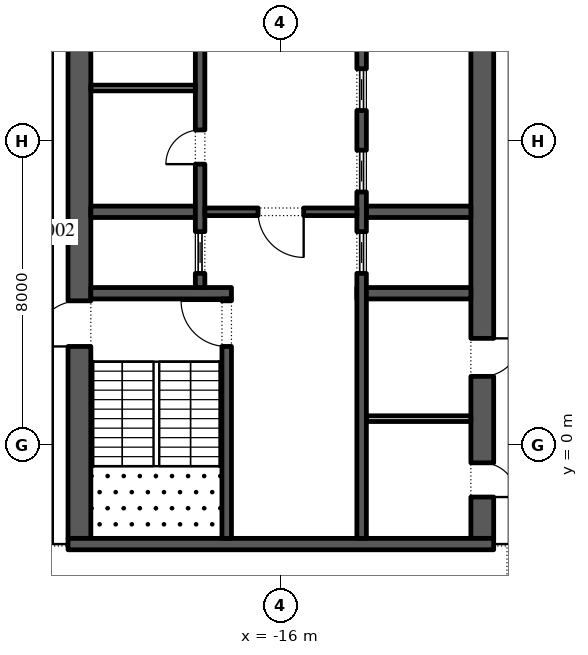
"""IFC4 building model, lengths in metres.
Left out: names, types, materials, properties, quantities, classifications, styles, units other than length and angle.
Written with IfcOpenShell. Run it as: python <this file> out.ifc"""

import sys

from ifc_helpers import new_model, si_unit, direction, frame, frame_2d, origin, place, context, subcontext, project, spatial, rectangle, extrude, element, fill, save


model = new_model("IFC4")
c1 = context("Model", 3, precision=1e-05, world=origin(), true_north=direction((0.0, 1.0)))
c2 = subcontext(c1, "Body", "Model", "MODEL_VIEW")
j1 = project(units=[si_unit("LENGTHUNIT", "METRE"), si_unit("PLANEANGLEUNIT", "RADIAN")], contexts=[c1])
p1 = place(None, origin())
s1 = spatial("IfcSite", under=j1, at=p1, CompositionType="ELEMENT")
p2 = place(p1, origin())
s2 = spatial("IfcBuilding", under=s1, at=p2, CompositionType="ELEMENT")
p3 = place(p2, frame((0.0, 0.0, 247.2)))
s3 = spatial("IfcBuildingStorey", under=s2, at=p3, CompositionType="ELEMENT", Elevation=247.2)
p4 = place(p3, frame((-21.359, 48.678, 0.0), z_axis=(0.0, 0.0, 1.0), x_axis=(-0.224949198343, -0.974370493275, 0.0)))
e1 = element("IfcWall", 1, at=p4, inside=s3, PredefinedType="STANDARD", context=c2, shape_type="SweptSolid", body=[
    extrude(rectangle(XDim=49.5, YDim=0.3, at=frame_2d((24.75, 0.0))), origin(), (0.0, 0.0, 1.0), 4.0),
])
p5 = place(p4, frame((1.157, 0.0, 0.45)))
e2 = element("IfcOpeningElement", 2, at=p5, cuts=e1, PredefinedType="OPENING", context=c2, shape_type="SweptSolid", body=[
    extrude(rectangle(XDim=4.5, YDim=3.05, at=frame_2d((2.25, 1.525))), frame((0.0, 0.16, 0.0), z_axis=(0.0, -1.0, 0.0), x_axis=(1.0, 0.0, 0.0)), (0.0, 0.0, 1.0), 0.32),
])
p6 = place(p4, frame((9.171, 0.0, 0.0)))
e3 = element("IfcOpeningElement", 3, at=p6, cuts=e1, PredefinedType="OPENING", context=c2, shape_type="SweptSolid", body=[
    extrude(rectangle(XDim=2.4, YDim=3.5, at=frame_2d((1.2, 1.75))), frame((0.0, 0.16, 0.0), z_axis=(0.0, -1.0, 0.0), x_axis=(1.0, 0.0, 0.0)), (0.0, 0.0, 1.0), 0.32),
])
p7 = place(p4, frame((15.236, 0.0, 0.45)))
e4 = element("IfcOpeningElement", 4, at=p7, cuts=e1, PredefinedType="OPENING", context=c2, shape_type="SweptSolid", body=[
    extrude(rectangle(XDim=4.5, YDim=3.05, at=frame_2d((2.25, 1.525))), frame((0.0, 0.16, 0.0), z_axis=(0.0, -1.0, 0.0), x_axis=(1.0, 0.0, 0.0)), (0.0, 0.0, 1.0), 0.32),
])
p8 = place(p4, frame((22.35, 0.0, 0.45)))
e5 = element("IfcOpeningElement", 5, at=p8, cuts=e1, PredefinedType="OPENING", context=c2, shape_type="SweptSolid", body=[
    extrude(rectangle(XDim=4.5, YDim=3.05, at=frame_2d((2.25, 1.525))), frame((0.0, 0.16, 0.0), z_axis=(0.0, -1.0, 0.0), x_axis=(1.0, 0.0, 0.0)), (0.0, 0.0, 1.0), 0.32),
])
p9 = place(p4, frame((29.464, 0.0, 0.45)))
e6 = element("IfcOpeningElement", 6, at=p9, cuts=e1, PredefinedType="OPENING", context=c2, shape_type="SweptSolid", body=[
    extrude(rectangle(XDim=4.5, YDim=3.05, at=frame_2d((2.25, 1.525))), frame((0.0, 0.16, 0.0), z_axis=(0.0, -1.0, 0.0), x_axis=(1.0, 0.0, 0.0)), (0.0, 0.0, 1.0), 0.32),
])
p10 = place(p4, frame((37.628, 0.0, 0.0)))
e7 = element("IfcOpeningElement", 7, at=p10, cuts=e1, PredefinedType="OPENING", context=c2, shape_type="SweptSolid", body=[
    extrude(rectangle(XDim=2.4, YDim=3.325, at=frame_2d((1.2, 1.663))), frame((0.0, 0.16, 0.0), z_axis=(0.0, -1.0, 0.0), x_axis=(1.0, 0.0, 0.0)), (0.0, 0.0, 1.0), 0.32),
])
p11 = place(p4, frame((43.693, 0.0, 0.45)))
e8 = element("IfcOpeningElement", 8, at=p11, cuts=e1, PredefinedType="OPENING", context=c2, shape_type="SweptSolid", body=[
    extrude(rectangle(XDim=4.5, YDim=2.825, at=frame_2d((2.25, 1.413))), frame((0.0, 0.16, 0.0), z_axis=(0.0, -1.0, 0.0), x_axis=(1.0, 0.0, 0.0)), (0.0, 0.0, 1.0), 0.32),
])
p12 = place(p3, frame((-21.3, -2.45, 0.0), z_axis=(0.0, 0.0, 1.0), x_axis=(0.0, 1.0, 0.0)))
e9 = element("IfcWall", 9, at=p12, inside=s3, PredefinedType="SHEAR", context=c2, shape_type="SweptSolid", body=[
    extrude(rectangle(XDim=27.9, YDim=0.6, at=frame_2d((13.95, 0.0))), origin(), (0.0, 0.0, 1.0), 4.0),
])
p13 = place(p12, frame((5.05, 0.0, 0.0)))
e10 = element("IfcOpeningElement", 10, at=p13, cuts=e9, PredefinedType="OPENING", context=c2, shape_type="SweptSolid", body=[
    extrude(rectangle(XDim=1.2, YDim=2.1, at=frame_2d((0.6, 1.05))), frame((0.0, 0.31, 0.0), z_axis=(0.0, -1.0, 0.0), x_axis=(1.0, 0.0, 0.0)), (0.0, 0.0, 1.0), 0.62),
])
p14 = place(p12, frame((21.65, 0.0, 0.0)))
e11 = element("IfcOpeningElement", 11, at=p14, cuts=e9, PredefinedType="OPENING", context=c2, shape_type="SweptSolid", body=[
    extrude(rectangle(XDim=1.2, YDim=2.1, at=frame_2d((0.6, 1.05))), frame((0.0, 0.31, 0.0), z_axis=(0.0, -1.0, 0.0), x_axis=(1.0, 0.0, 0.0)), (0.0, 0.0, 1.0), 0.62),
])
p15 = place(p3, frame((-10.7, -2.45, 0.0), z_axis=(0.0, 0.0, 1.0), x_axis=(0.0, 1.0, 0.0)))
e12 = element("IfcWall", 12, at=p15, inside=s3, PredefinedType="SHEAR", context=c2, shape_type="SweptSolid", body=[
    extrude(rectangle(XDim=27.9, YDim=0.6, at=frame_2d((13.95, 0.0))), origin(), (0.0, 0.0, 1.0), 4.0),
])
p16 = place(p15, frame((23.65, 0.0, 0.0)))
e13 = element("IfcOpeningElement", 13, at=p16, cuts=e12, PredefinedType="OPENING", context=c2, shape_type="SweptSolid", body=[
    extrude(rectangle(XDim=2.4, YDim=2.1, at=frame_2d((1.2, 1.05))), frame((0.0, 0.31, 0.0), z_axis=(0.0, -1.0, 0.0), x_axis=(1.0, 0.0, 0.0)), (0.0, 0.0, 1.0), 0.62),
])
p17 = place(p15, frame((1.087, 0.0, 0.0)))
e14 = element("IfcOpeningElement", 14, at=p17, cuts=e12, PredefinedType="OPENING", context=c2, shape_type="SweptSolid", body=[
    extrude(rectangle(XDim=0.9, YDim=2.1, at=frame_2d((0.45, 1.05))), frame((0.0, 0.31, 0.0), z_axis=(0.0, -1.0, 0.0), x_axis=(1.0, 0.0, 0.0)), (0.0, 0.0, 1.0), 0.62),
])
p18 = place(p15, frame((4.262, 0.0, 0.0)))
e15 = element("IfcOpeningElement", 15, at=p18, cuts=e12, PredefinedType="OPENING", context=c2, shape_type="SweptSolid", body=[
    extrude(rectangle(XDim=1.0, YDim=2.1, at=frame_2d((0.5, 1.05))), frame((0.0, 0.31, 0.0), z_axis=(0.0, -1.0, 0.0), x_axis=(1.0, 0.0, 0.0)), (0.0, 0.0, 1.0), 0.62),
])
p19 = place(p3, frame((-21.6, -2.6, 0.0), z_axis=(0.0, 0.0, 1.0), x_axis=(1.0, 0.0, 0.0)))
e16 = element("IfcWall", 16, at=p19, inside=s3, PredefinedType="SHEAR", context=c2, shape_type="SweptSolid", body=[
    extrude(rectangle(XDim=11.2, YDim=0.3, at=frame_2d((5.6, 0.0))), origin(), (0.0, 0.0, 1.0), 4.0),
])
p20 = place(p3, frame((-21.0, 4.0, 0.0), z_axis=(0.0, 0.0, 1.0), x_axis=(1.0, 0.0, 0.0)))
e17 = element("IfcWall", 17, at=p20, inside=s3, PredefinedType="SHEAR", context=c2, shape_type="SweptSolid", body=[
    extrude(rectangle(XDim=3.7, YDim=0.3, at=frame_2d((1.85, 0.0))), origin(), (0.0, 0.0, 1.0), 4.0),
])
p21 = place(p3, frame((-17.425, -2.45, 0.0), z_axis=(0.0, 0.0, 1.0), x_axis=(0.0, 1.0, 0.0)))
e18 = element("IfcWall", 18, at=p21, inside=s3, PredefinedType="SHEAR", context=c2, shape_type="SweptSolid", body=[
    extrude(rectangle(XDim=6.3, YDim=0.25, at=frame_2d((3.15, 0.0))), origin(), (0.0, 0.0, 1.0), 4.0),
])
p22 = place(p21, frame((5.05, 0.0, 0.0)))
e19 = element("IfcOpeningElement", 19, at=p22, cuts=e18, PredefinedType="OPENING", context=c2, shape_type="SweptSolid", body=[
    extrude(rectangle(XDim=1.2, YDim=2.1, at=frame_2d((0.6, 1.05))), frame((0.0, 0.135, 0.0), z_axis=(0.0, -1.0, 0.0), x_axis=(1.0, 0.0, 0.0)), (0.0, 0.0, 1.0), 0.27),
])
p23 = place(p3, frame((-21.0, 6.143, 0.0), z_axis=(0.0, 0.0, 1.0), x_axis=(1.0, 0.0, 0.0)))
e20 = element("IfcWall", 20, at=p23, inside=s3, PredefinedType="SHEAR", context=c2, shape_type="SweptSolid", body=[
    extrude(rectangle(XDim=2.75, YDim=0.3, at=frame_2d((1.375, 0.0))), origin(), (0.0, 0.0, 1.0), 4.0),
])
p24 = place(p3, frame((-18.125, 4.15, 0.0), z_axis=(0.0, 0.0, 1.0), x_axis=(0.0, 1.0, 0.0)))
e21 = element("IfcWall", 21, at=p24, inside=s3, PredefinedType="SHEAR", context=c2, shape_type="SweptSolid", body=[
    extrude(rectangle(XDim=14.7, YDim=0.25, at=frame_2d((7.35, 0.0))), origin(), (0.0, 0.0, 1.0), 4.0),
])
p25 = place(p24, frame((3.246, 0.0, 0.0)))
e22 = element("IfcOpeningElement", 22, at=p25, cuts=e21, PredefinedType="OPENING", context=c2, shape_type="SweptSolid", body=[
    extrude(rectangle(XDim=0.9, YDim=2.1, at=frame_2d((0.45, 1.05))), frame((0.0, 0.135, 0.0), z_axis=(0.0, -1.0, 0.0), x_axis=(1.0, 0.0, 0.0)), (0.0, 0.0, 1.0), 0.27),
])
p26 = place(p24, frame((8.454, 0.0, 0.0)))
e23 = element("IfcOpeningElement", 23, at=p26, cuts=e21, PredefinedType="OPENING", context=c2, shape_type="SweptSolid", body=[
    extrude(rectangle(XDim=0.9, YDim=2.1, at=frame_2d((0.45, 1.05))), frame((0.0, 0.135, 0.0), z_axis=(0.0, -1.0, 0.0), x_axis=(1.0, 0.0, 0.0)), (0.0, 0.0, 1.0), 0.27),
])
p27 = place(p24, frame((0.371, 0.0, 0.0)))
e24 = element("IfcOpeningElement", 24, at=p27, cuts=e21, PredefinedType="OPENING", context=c2, shape_type="SweptSolid", body=[
    extrude(rectangle(XDim=1.1, YDim=2.1, at=frame_2d((0.55, 1.05))), frame((0.0, 0.135, 0.0), z_axis=(0.0, -1.0, 0.0), x_axis=(1.0, 0.0, 0.0)), (0.0, 0.0, 1.0), 0.27),
])
p28 = place(p24, frame((13.229, 0.0, 0.0)))
e25 = element("IfcOpeningElement", 25, at=p28, cuts=e21, PredefinedType="OPENING", context=c2, shape_type="SweptSolid", body=[
    extrude(rectangle(XDim=1.1, YDim=2.1, at=frame_2d((0.55, 1.05))), frame((0.0, 0.135, 0.0), z_axis=(0.0, -1.0, 0.0), x_axis=(1.0, 0.0, 0.0)), (0.0, 0.0, 1.0), 0.27),
])
p29 = place(p3, frame((-21.0, 9.4, 0.0), z_axis=(0.0, 0.0, 1.0), x_axis=(1.0, 0.0, 0.0)))
e26 = element("IfcWall", 26, at=p29, inside=s3, PredefinedType="PARTITIONING", context=c2, shape_type="SweptSolid", body=[
    extrude(rectangle(XDim=2.75, YDim=0.15, at=frame_2d((1.375, 0.0))), origin(), (0.0, 0.0, 1.0), 4.0),
])
p30 = place(p3, frame((-14.0, 4.0, 0.0), z_axis=(0.0, 0.0, 1.0), x_axis=(1.0, 0.0, 0.0)))
e27 = element("IfcWall", 27, at=p30, inside=s3, PredefinedType="SHEAR", context=c2, shape_type="SweptSolid", body=[
    extrude(rectangle(XDim=3.0, YDim=0.3, at=frame_2d((1.5, 0.0))), origin(), (0.0, 0.0, 1.0), 4.0),
])
p31 = place(p3, frame((-13.75, 6.143, 0.0), z_axis=(0.0, 0.0, 1.0), x_axis=(1.0, 0.0, 0.0)))
e28 = element("IfcWall", 28, at=p31, inside=s3, PredefinedType="SHEAR", context=c2, shape_type="SweptSolid", body=[
    extrude(rectangle(XDim=2.75, YDim=0.3, at=frame_2d((1.375, 0.0))), origin(), (0.0, 0.0, 1.0), 4.0),
])
p32 = place(p3, frame((-13.875, -2.45, 0.0), z_axis=(0.0, 0.0, 1.0), x_axis=(0.0, 1.0, 0.0)))
e29 = element("IfcWall", 29, at=p32, inside=s3, PredefinedType="SHEAR", context=c2, shape_type="SweptSolid", body=[
    extrude(rectangle(XDim=21.3, YDim=0.25, at=frame_2d((10.65, 0.0))), origin(), (0.0, 0.0, 1.0), 4.0),
])
p33 = place(p32, frame((16.261, 0.0, 0.0)))
e30 = element("IfcOpeningElement", 30, at=p33, cuts=e29, PredefinedType="OPENING", context=c2, shape_type="SweptSolid", body=[
    extrude(rectangle(XDim=0.9, YDim=2.1, at=frame_2d((0.45, 1.05))), frame((0.0, 0.135, 0.0), z_axis=(0.0, -1.0, 0.0), x_axis=(1.0, 0.0, 0.0)), (0.0, 0.0, 1.0), 0.27),
])
p34 = place(p32, frame((19.325, 0.0, 0.0)))
e31 = element("IfcOpeningElement", 31, at=p34, cuts=e29, PredefinedType="OPENING", context=c2, shape_type="SweptSolid", body=[
    extrude(rectangle(XDim=0.9, YDim=2.1, at=frame_2d((0.45, 1.05))), frame((0.0, 0.135, 0.0), z_axis=(0.0, -1.0, 0.0), x_axis=(1.0, 0.0, 0.0)), (0.0, 0.0, 1.0), 0.27),
])
p35 = place(p32, frame((6.971, 0.0, 0.0)))
e32 = element("IfcOpeningElement", 32, at=p35, cuts=e29, PredefinedType="OPENING", context=c2, shape_type="SweptSolid", body=[
    extrude(rectangle(XDim=1.1, YDim=2.1, at=frame_2d((0.55, 1.05))), frame((0.0, 0.135, 0.0), z_axis=(0.0, -1.0, 0.0), x_axis=(1.0, 0.0, 0.0)), (0.0, 0.0, 1.0), 0.27),
])
p36 = place(p32, frame((9.114, 0.0, 0.0)))
e33 = element("IfcOpeningElement", 33, at=p36, cuts=e29, PredefinedType="OPENING", context=c2, shape_type="SweptSolid", body=[
    extrude(rectangle(XDim=1.1, YDim=2.1, at=frame_2d((0.55, 1.05))), frame((0.0, 0.135, 0.0), z_axis=(0.0, -1.0, 0.0), x_axis=(1.0, 0.0, 0.0)), (0.0, 0.0, 1.0), 0.27),
])
p37 = place(p32, frame((11.257, 0.0, 0.0)))
e34 = element("IfcOpeningElement", 34, at=p37, cuts=e29, PredefinedType="OPENING", context=c2, shape_type="SweptSolid", body=[
    extrude(rectangle(XDim=1.1, YDim=2.1, at=frame_2d((0.55, 1.05))), frame((0.0, 0.135, 0.0), z_axis=(0.0, -1.0, 0.0), x_axis=(1.0, 0.0, 0.0)), (0.0, 0.0, 1.0), 0.27),
])
p38 = place(p32, frame((13.4, 0.0, 0.0)))
e35 = element("IfcOpeningElement", 35, at=p38, cuts=e29, PredefinedType="OPENING", context=c2, shape_type="SweptSolid", body=[
    extrude(rectangle(XDim=1.1, YDim=2.1, at=frame_2d((0.55, 1.05))), frame((0.0, 0.135, 0.0), z_axis=(0.0, -1.0, 0.0), x_axis=(1.0, 0.0, 0.0)), (0.0, 0.0, 1.0), 0.27),
])
p39 = place(p3, frame((-18.0, 6.143, 0.0), z_axis=(0.0, 0.0, 1.0), x_axis=(1.0, 0.0, 0.0)))
e36 = element("IfcWall", 36, at=p39, inside=s3, PredefinedType="SHEAR", context=c2, shape_type="SweptSolid", body=[
    extrude(rectangle(XDim=4.0, YDim=0.2, at=frame_2d((2.0, 0.0))), origin(), (0.0, 0.0, 1.0), 4.0),
])
p40 = place(p39, frame((1.4, 0.0, 0.0)))
e37 = element("IfcOpeningElement", 37, at=p40, cuts=e36, PredefinedType="OPENING", context=c2, shape_type="SweptSolid", body=[
    extrude(rectangle(XDim=1.2, YDim=2.1, at=frame_2d((0.6, 1.05))), frame((0.0, 0.11, 0.0), z_axis=(0.0, -1.0, 0.0), x_axis=(1.0, 0.0, 0.0)), (0.0, 0.0, 1.0), 0.22),
])
p41 = place(p3, frame((-13.75, 0.7, 0.0), z_axis=(0.0, 0.0, 1.0), x_axis=(1.0, 0.0, 0.0)))
e38 = element("IfcWall", 38, at=p41, inside=s3, PredefinedType="PARTITIONING", context=c2, shape_type="SweptSolid", body=[
    extrude(rectangle(XDim=2.75, YDim=0.15, at=frame_2d((1.375, 0.0))), origin(), (0.0, 0.0, 1.0), 4.0),
])
p42 = place(p25, origin())
e39 = element("IfcDoor", 39, at=p42, inside=s3, OperationType="SINGLE_SWING_RIGHT", PredefinedType="DOOR", context=c2, shape_type="SweptSolid", body=[
    extrude(rectangle(XDim=0.9, YDim=2.1, at=frame_2d((0.45, 1.05))), frame((0.0, 0.125, 0.0), z_axis=(0.0, -1.0, 0.0), x_axis=(1.0, 0.0, 0.0)), (0.0, 0.0, 1.0), 0.05),
])
fill(e22, e39)
p43 = place(p27, origin())
e40 = element("IfcDoor", 40, at=p43, inside=s3, OperationType="SLIDING_TO_LEFT", PredefinedType="DOOR", context=c2, shape_type="SweptSolid", body=[
    extrude(rectangle(XDim=1.1, YDim=2.1, at=frame_2d((0.55, 1.05))), frame((0.0, 0.025, 0.0), z_axis=(0.0, -1.0, 0.0), x_axis=(1.0, 0.0, 0.0)), (0.0, 0.0, 1.0), 0.05),
])
fill(e24, e40)
p44 = place(p35, origin())
e41 = element("IfcDoor", 41, at=p44, inside=s3, OperationType="SLIDING_TO_LEFT", PredefinedType="DOOR", context=c2, shape_type="SweptSolid", body=[
    extrude(rectangle(XDim=1.1, YDim=2.1, at=frame_2d((0.55, 1.05))), frame((0.0, 0.025, 0.0), z_axis=(0.0, -1.0, 0.0), x_axis=(1.0, 0.0, 0.0)), (0.0, 0.0, 1.0), 0.05),
])
fill(e32, e41)
p45 = place(p36, origin())
e42 = element("IfcDoor", 42, at=p45, inside=s3, OperationType="SLIDING_TO_LEFT", PredefinedType="DOOR", context=c2, shape_type="SweptSolid", body=[
    extrude(rectangle(XDim=1.1, YDim=2.1, at=frame_2d((0.55, 1.05))), frame((0.0, 0.025, 0.0), z_axis=(0.0, -1.0, 0.0), x_axis=(1.0, 0.0, 0.0)), (0.0, 0.0, 1.0), 0.05),
])
fill(e33, e42)
p46 = place(p37, origin())
e43 = element("IfcDoor", 43, at=p46, inside=s3, OperationType="SLIDING_TO_LEFT", PredefinedType="DOOR", context=c2, shape_type="SweptSolid", body=[
    extrude(rectangle(XDim=1.1, YDim=2.1, at=frame_2d((0.55, 1.05))), frame((0.0, 0.025, 0.0), z_axis=(0.0, -1.0, 0.0), x_axis=(1.0, 0.0, 0.0)), (0.0, 0.0, 1.0), 0.05),
])
fill(e34, e43)
p47 = place(p40, frame((1.2, 0.0, 0.0), z_axis=(0.0, 0.0, 1.0), x_axis=(-1.0, 0.0, 0.0)))
e44 = element("IfcDoor", 44, at=p47, inside=s3, OperationType="SINGLE_SWING_RIGHT", PredefinedType="DOOR", context=c2, shape_type="SweptSolid", body=[
    extrude(rectangle(XDim=1.2, YDim=2.1, at=frame_2d((0.6, 1.05))), frame((0.0, 0.025, 0.0), z_axis=(0.0, -1.0, 0.0), x_axis=(1.0, 0.0, 0.0)), (0.0, 0.0, 1.0), 0.05),
])
fill(e37, e44)
p48 = place(p22, origin())
e45 = element("IfcDoor", 45, at=p48, inside=s3, OperationType="SINGLE_SWING_LEFT", PredefinedType="DOOR", context=c2, shape_type="SweptSolid", body=[
    extrude(rectangle(XDim=1.2, YDim=2.1, at=frame_2d((0.6, 1.05))), frame((0.0, 0.025, 0.0), z_axis=(0.0, -1.0, 0.0), x_axis=(1.0, 0.0, 0.0)), (0.0, 0.0, 1.0), 0.05),
])
fill(e19, e45)
p49 = place(p13, origin())
e46 = element("IfcDoor", 46, at=p49, inside=s3, OperationType="SINGLE_SWING_RIGHT", PredefinedType="DOOR", context=c2, shape_type="SweptSolid", body=[
    extrude(rectangle(XDim=1.2, YDim=2.1, at=frame_2d((0.6, 1.05))), frame((0.0, 0.025, 0.0), z_axis=(0.0, -1.0, 0.0), x_axis=(1.0, 0.0, 0.0)), (0.0, 0.0, 1.0), 0.05),
])
fill(e10, e46)
p50 = place(p17, frame((0.9, 0.55, 0.0), z_axis=(0.0, 0.0, 1.0), x_axis=(-1.0, 0.0, 0.0)))
e47 = element("IfcDoor", 47, at=p50, inside=s3, OperationType="SINGLE_SWING_LEFT", PredefinedType="DOOR", context=c2, shape_type="SweptSolid", body=[
    extrude(rectangle(XDim=0.9, YDim=2.1, at=frame_2d((0.45, 1.05))), frame((0.0, 0.3, 0.0), z_axis=(0.0, -1.0, 0.0), x_axis=(1.0, 0.0, 0.0)), (0.0, 0.0, 1.0), 0.05),
])
fill(e14, e47)
p51 = place(p18, frame((1.0, 0.55, 0.0), z_axis=(0.0, 0.0, 1.0), x_axis=(-1.0, 0.0, 0.0)))
e48 = element("IfcDoor", 48, at=p51, inside=s3, OperationType="SINGLE_SWING_RIGHT", PredefinedType="DOOR", context=c2, shape_type="SweptSolid", body=[
    extrude(rectangle(XDim=1.0, YDim=2.1, at=frame_2d((0.5, 1.05))), frame((0.0, 0.3, 0.0), z_axis=(0.0, -1.0, 0.0), x_axis=(1.0, 0.0, 0.0)), (0.0, 0.0, 1.0), 0.05),
])
fill(e15, e48)
save(model, sys.argv[1])
